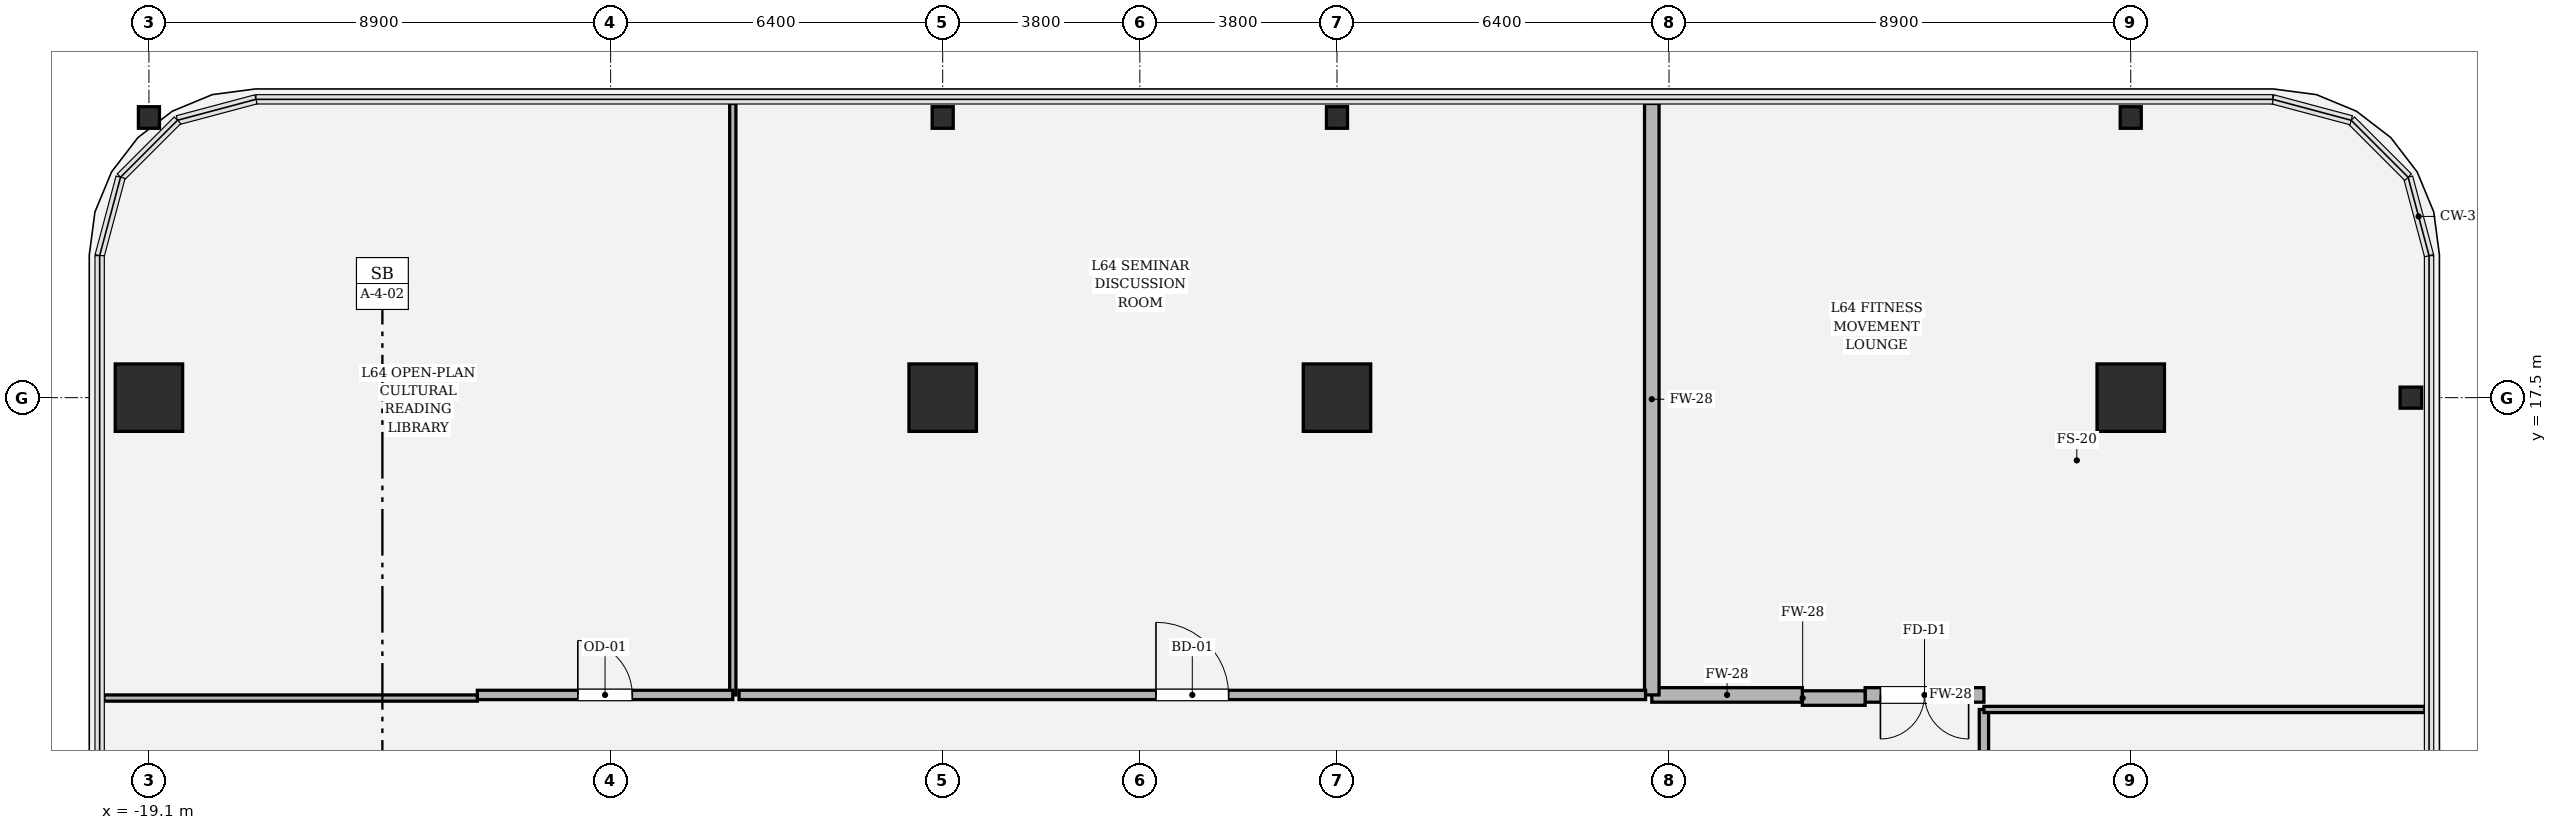
"""IFC4 building model, lengths in metres.
Left out: names, types, materials, properties, quantities, classifications, styles, units other than length and angle.
Written with IfcOpenShell. Run it as: python <this file> out.ifc"""

import sys

from ifc_helpers import new_model, si_unit, direction, frame, frame_2d, origin, origin_2d, place, context, subcontext, project, spatial, rectangle, hollow_rectangle, i_section, extrude, element, fill, save


model = new_model("IFC4")
c1 = context("Model", 3, precision=1e-05, world=origin(), true_north=direction((0.0, 1.0)))
c2 = subcontext(c1, "Body", "Model", "MODEL_VIEW")
j1 = project(units=[si_unit("LENGTHUNIT", "METRE"), si_unit("PLANEANGLEUNIT", "RADIAN")], contexts=[c1])
p1 = place(None, origin())
s1 = spatial("IfcSite", under=j1, at=p1, CompositionType="ELEMENT")
p2 = place(p1, origin())
s2 = spatial("IfcBuilding", under=s1, at=p2, CompositionType="ELEMENT")
p3 = place(p2, frame((0.0, 0.0, 271.65)))
s3 = spatial("IfcBuildingStorey", under=s2, at=p3, CompositionType="ELEMENT", Elevation=271.65)
for number, where, z_axis, x_axis in (
    (1, (19.1, 17.5, 0.0), (0.0, 0.0, 1.0), (1.0, 0.0, 0.0)),
    (2, (3.8, 17.5, 0.0), (0.0, 0.0, 1.0), (1.0, 0.0, 0.0)),
    (3, (-3.8, 17.5, 0.0), (0.0, 0.0, 1.0), (1.0, 0.0, 0.0)),
    (4, (-19.1, 17.5, 0.0), (0.0, 0.0, 1.0), (1.0, 0.0, 0.0)),
):
    element("IfcColumn", number, at=place(p3, frame(where, z_axis=z_axis, x_axis=x_axis)), inside=s3, PredefinedType="COLUMN", context=c2, shape_type="SweptSolid", body=[
        extrude(hollow_rectangle(XDim=1.3, YDim=1.3, WallThickness=0.038, at=origin_2d()), origin(), (0.0, 0.0, 1.0), 4.05),
    ])
for number, where, z_axis, x_axis in (
    (5, (-19.1, 22.9, 0.0), (0.0, 0.0, 1.0), (1.0, 0.0, 0.0)),
    (6, (-3.8, 22.9, 0.0), (0.0, 0.0, 1.0), (1.0, 0.0, 0.0)),
    (7, (3.8, 22.9, 0.0), (0.0, 0.0, 1.0), (1.0, 0.0, 0.0)),
    (8, (19.1, 22.9, 0.0), (0.0, 0.0, 1.0), (1.0, 0.0, 0.0)),
    (9, (24.5, 17.5, 0.0), (0.0, 0.0, 1.0), (0.0, 1.0, 0.0)),
):
    element("IfcColumn", number, at=place(p3, frame(where, z_axis=z_axis, x_axis=x_axis)), inside=s3, PredefinedType="COLUMN", context=c2, shape_type="SweptSolid", body=[
        extrude(i_section(OverallWidth=0.406, OverallDepth=0.416, WebThickness=0.029, FlangeThickness=0.048, FilletRadius=0.018, at=origin_2d()), origin(), (0.0, 0.0, 1.0), 4.048),
    ])
p4 = place(p3, frame((16.27, 1.89, 0.0), z_axis=(0.0, 0.0, 1.0), x_axis=(0.0, 1.0, 0.0)))
e10 = element("IfcWall", 10, at=p4, inside=s3, PredefinedType="PARTITIONING", context=c2, shape_type="SweptSolid", body=[
    extrude(rectangle(XDim=9.6, YDim=0.18, at=frame_2d((4.8, 0.0))), origin(), (0.0, 0.0, 1.0), 3.244),
])
p5 = place(p4, frame((4.275, 0.0, 0.0)))
e11 = element("IfcOpeningElement", 11, at=p5, cuts=e10, PredefinedType="OPENING", context=c2, shape_type="SweptSolid", body=[
    extrude(rectangle(XDim=1.05, YDim=2.2, at=frame_2d((0.525, 1.1))), frame((0.0, 0.1, 0.0), z_axis=(0.0, -1.0, 0.0), x_axis=(1.0, 0.0, 0.0)), (0.0, 0.0, 1.0), 0.2),
])
p6 = place(p3, frame((16.27, 11.49, 0.0), z_axis=(0.0, 0.0, 1.0), x_axis=(1.0, 0.0, 0.0)))
e12 = element("IfcWall", 12, at=p6, inside=s3, PredefinedType="PARTITIONING", context=c2, shape_type="SweptSolid", body=[
    extrude(rectangle(XDim=8.5, YDim=0.12, at=frame_2d((4.25, 0.0))), origin(), (0.0, 0.0, 1.0), 2.564),
])
p7 = place(p3, frame((-7.846, 23.17, 0.0), z_axis=(0.0, 0.0, 1.0), x_axis=(0.0, -1.0, 0.0)))
e13 = element("IfcWall", 13, at=p7, inside=s3, PredefinedType="PARTITIONING", context=c2, shape_type="SweptSolid", body=[
    extrude(rectangle(XDim=11.4, YDim=0.12, at=frame_2d((5.7, 0.0))), origin(), (0.0, 0.0, 1.0), 2.564),
])
p8 = place(p3, frame((-7.846, 11.77, 0.0), z_axis=(0.0, 0.0, 1.0), x_axis=(-1.0, 0.0, 0.0)))
e14 = element("IfcWall", 14, at=p8, inside=s3, PredefinedType="PARTITIONING", context=c2, shape_type="SweptSolid", body=[
    extrude(rectangle(XDim=4.924, YDim=0.18, at=frame_2d((2.462, 0.0))), origin(), (0.0, 0.0, 1.0), 3.244),
])
p9 = place(p8, frame((1.937, 0.0, 0.0)))
e15 = element("IfcOpeningElement", 15, at=p9, cuts=e14, PredefinedType="OPENING", context=c2, shape_type="SweptSolid", body=[
    extrude(rectangle(XDim=1.05, YDim=2.2, at=frame_2d((0.525, 1.1))), frame((0.0, 0.1, 0.0), z_axis=(0.0, -1.0, 0.0), x_axis=(1.0, 0.0, 0.0)), (0.0, 0.0, 1.0), 0.2),
])
p10 = place(p3, frame((-12.77, 11.71, 0.0), z_axis=(0.0, 0.0, 1.0), x_axis=(-1.0, 0.0, 0.0)))
e16 = element("IfcWall", 16, at=p10, inside=s3, PredefinedType="PARTITIONING", context=c2, shape_type="SweptSolid", body=[
    extrude(rectangle(XDim=7.2, YDim=0.12, at=frame_2d((3.6, 0.0))), origin(), (0.0, 0.0, 1.0), 3.244),
])
p11 = place(p3, frame((16.27, 11.77, 0.0), z_axis=(0.0, 0.0, 1.0), x_axis=(-1.0, 0.0, 0.0)))
e17 = element("IfcWall", 17, at=p11, inside=s3, PredefinedType="SOLIDWALL", context=c2, shape_type="SweptSolid", body=[
    extrude(rectangle(XDim=2.29, YDim=0.28, at=frame_2d((1.145, 0.0))), origin(), (0.0, 0.0, 1.0), 3.484),
])
p12 = place(p11, frame((0.295, 0.0, 0.0)))
e18 = element("IfcOpeningElement", 18, at=p12, cuts=e17, PredefinedType="OPENING", context=c2, shape_type="SweptSolid", body=[
    extrude(rectangle(XDim=1.7, YDim=2.3, at=frame_2d((0.85, 1.15))), frame((0.0, 0.15, 0.0), z_axis=(0.0, -1.0, 0.0), x_axis=(1.0, 0.0, 0.0)), (0.0, 0.0, 1.0), 0.3),
])
p13 = place(p3, frame((13.98, 11.71, 0.0), z_axis=(0.0, 0.0, 1.0), x_axis=(-1.0, 0.0, 0.0)))
e19 = element("IfcWall", 19, at=p13, inside=s3, PredefinedType="SOLIDWALL", context=c2, shape_type="SweptSolid", body=[
    extrude(rectangle(XDim=1.21, YDim=0.28, at=frame_2d((0.605, 0.0))), origin(), (0.0, 0.0, 1.0), 3.85),
])
p14 = place(p3, frame((12.77, 11.77, 0.0), z_axis=(0.0, 0.0, 1.0), x_axis=(-1.0, 0.0, 0.0)))
e20 = element("IfcWall", 20, at=p14, inside=s3, PredefinedType="SOLIDWALL", context=c2, shape_type="SweptSolid", body=[
    extrude(rectangle(XDim=2.902, YDim=0.28, at=frame_2d((1.451, 0.0))), origin(), (0.0, 0.0, 1.0), 3.244),
])
p15 = place(p3, frame((9.868, 11.77, 0.0), z_axis=(0.0, 0.0, 1.0), x_axis=(0.0, 1.0, 0.0)))
e21 = element("IfcWall", 21, at=p15, inside=s3, PredefinedType="SOLIDWALL", context=c2, shape_type="SweptSolid", body=[
    extrude(rectangle(XDim=11.4, YDim=0.28, at=frame_2d((5.7, 0.0))), origin(), (0.0, 0.0, 1.0), 2.564),
])
p16 = place(p3, frame((9.748, 11.77, 0.0), z_axis=(0.0, 0.0, 1.0), x_axis=(-1.0, 0.0, 0.0)))
e22 = element("IfcWall", 22, at=p16, inside=s3, PredefinedType="PARTITIONING", context=c2, shape_type="SweptSolid", body=[
    extrude(rectangle(XDim=17.474, YDim=0.18, at=frame_2d((8.737, 0.0))), origin(), (0.0, 0.0, 1.0), 3.244),
])
p17 = place(p16, frame((8.037, 0.0, 0.0)))
e23 = element("IfcOpeningElement", 23, at=p17, cuts=e22, PredefinedType="OPENING", context=c2, shape_type="SweptSolid", body=[
    extrude(rectangle(XDim=1.4, YDim=2.25, at=frame_2d((0.7, 1.125))), frame((0.0, 0.1, 0.0), z_axis=(0.0, -1.0, 0.0), x_axis=(1.0, 0.0, 0.0)), (0.0, 0.0, 1.0), 0.2),
])
p18 = place(p9, origin())
e24 = element("IfcDoor", 24, at=p18, inside=s3, OperationType="SINGLE_SWING_RIGHT", PredefinedType="DOOR", context=c2, shape_type="SweptSolid", body=[
    extrude(rectangle(XDim=1.05, YDim=2.2, at=frame_2d((0.525, 1.1))), frame((0.0, 0.025, 0.0), z_axis=(0.0, -1.0, 0.0), x_axis=(1.0, 0.0, 0.0)), (0.0, 0.0, 1.0), 0.05),
])
fill(e15, e24)
p19 = place(p12, origin())
e25 = element("IfcDoor", 25, at=p19, inside=s3, OperationType="DOUBLE_DOOR_SINGLE_SWING", PredefinedType="DOOR", context=c2, shape_type="SweptSolid", body=[
    extrude(rectangle(XDim=1.7, YDim=2.3, at=frame_2d((0.85, 1.15))), frame((0.0, 0.025, 0.0), z_axis=(0.0, -1.0, 0.0), x_axis=(1.0, 0.0, 0.0)), (0.0, 0.0, 1.0), 0.05),
])
fill(e18, e25)
p20 = place(p17, origin())
e26 = element("IfcDoor", 26, at=p20, inside=s3, OperationType="SINGLE_SWING_RIGHT", PredefinedType="DOOR", context=c2, shape_type="SweptSolid", body=[
    extrude(rectangle(XDim=1.4, YDim=2.25, at=frame_2d((0.7, 1.125))), frame((0.0, 0.025, 0.0), z_axis=(0.0, -1.0, 0.0), x_axis=(1.0, 0.0, 0.0)), (0.0, 0.0, 1.0), 0.05),
])
fill(e23, e26)
save(model, sys.argv[1])
